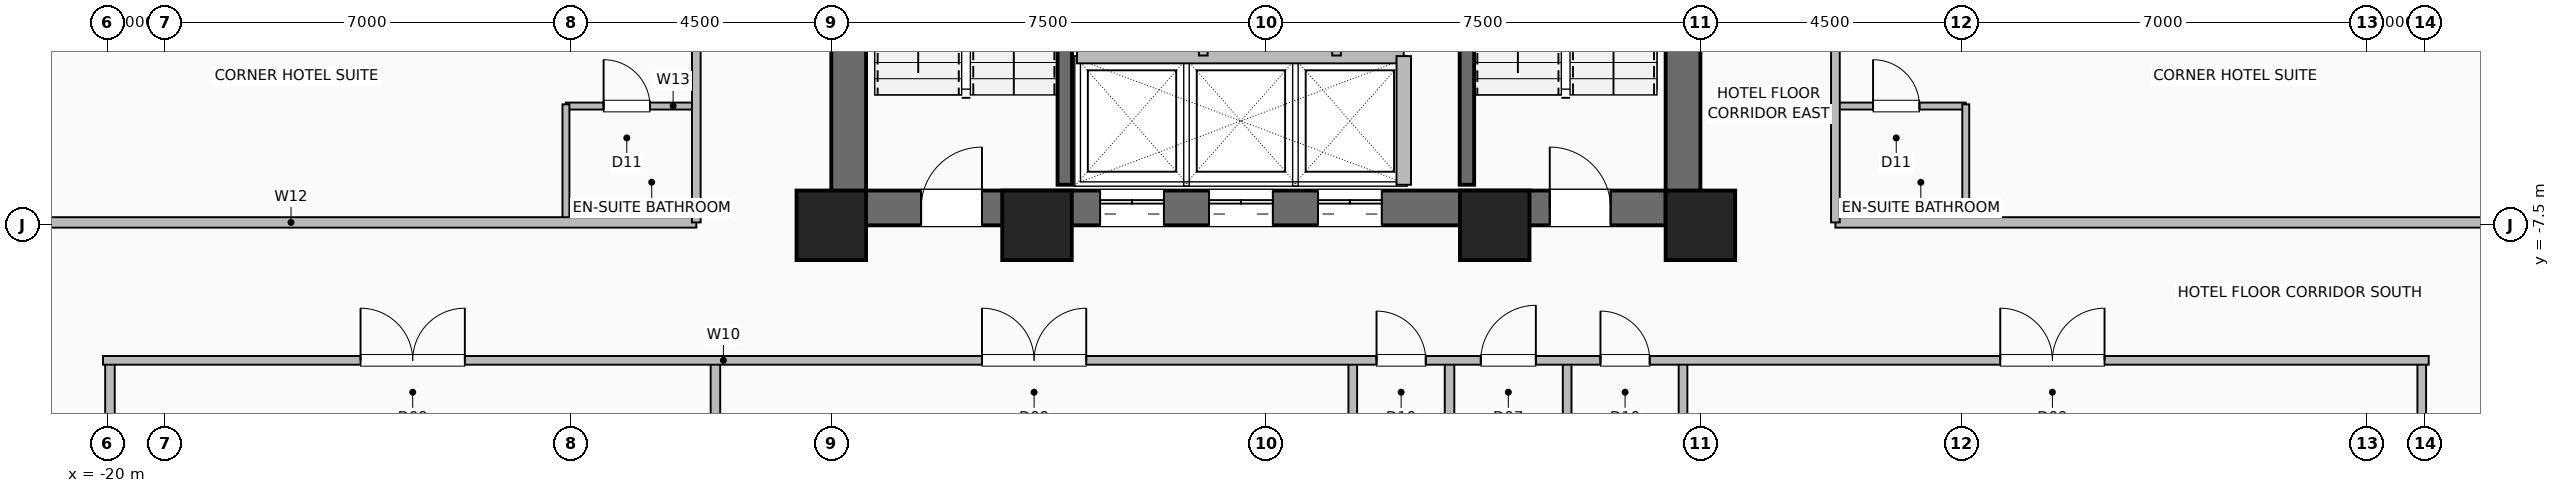
"""IFC4 building model, lengths in metres.
Left out: names, types, materials, properties, quantities, classifications, styles, units other than length and angle.
Written with IfcOpenShell. Run it as: python <this file> out.ifc"""

import sys

from ifc_helpers import new_model, si_unit, direction, frame, frame_2d, origin, origin_2d, place, context, subcontext, project, spatial, rectangle, hollow_rectangle, extrude, element, fill, save


model = new_model("IFC4")
c1 = context("Model", 3, precision=1e-05, world=origin(), true_north=direction((0.0, 1.0)))
c2 = subcontext(c1, "Body", "Model", "MODEL_VIEW")
j1 = project(units=[si_unit("LENGTHUNIT", "METRE"), si_unit("PLANEANGLEUNIT", "RADIAN")], contexts=[c1])
p1 = place(None, origin())
s1 = spatial("IfcSite", under=j1, at=p1, CompositionType="ELEMENT")
p2 = place(p1, origin())
s2 = spatial("IfcBuilding", under=s1, at=p2, CompositionType="ELEMENT")
p3 = place(p2, frame((0.0, 0.0, 48.0)))
s3 = spatial("IfcBuildingStorey", under=s2, at=p3, CompositionType="ELEMENT", Elevation=48.0)
for number, where, z_axis, x_axis in (
    (1, (-7.5, -7.5, 0.0), (0.0, 0.0, 1.0), (1.0, 0.0, 0.0)),
    (2, (-3.95, -7.5, 0.0), (0.0, 0.0, 1.0), (1.0, 0.0, 0.0)),
    (3, (3.95, -7.5, 0.0), (0.0, 0.0, 1.0), (1.0, 0.0, 0.0)),
    (4, (7.5, -7.5, 0.0), (0.0, 0.0, 1.0), (1.0, 0.0, 0.0)),
):
    element("IfcColumn", number, at=place(p3, frame(where, z_axis=z_axis, x_axis=x_axis)), inside=s3, PredefinedType="COLUMN", context=c2, shape_type="SweptSolid", body=[
        extrude(hollow_rectangle(XDim=1.2, YDim=1.2, WallThickness=0.055, at=origin_2d()), origin(), (0.0, 0.0, 1.0), 3.5),
    ])
p4 = place(p3, frame((-7.5, -7.2, 0.0), z_axis=(0.0, 0.0, 1.0), x_axis=(1.0, 0.0, 0.0)))
e5 = element("IfcWall", 5, at=p4, inside=s3, PredefinedType="SHEAR", context=c2, shape_type="SweptSolid", body=[
    extrude(rectangle(XDim=15.0, YDim=0.6, at=frame_2d((7.5, 0.0))), origin(), (0.0, 0.0, 1.0), 3.25),
])
p5 = place(p4, frame((1.55, 0.0, 0.0)))
e6 = element("IfcOpeningElement", 6, at=p5, cuts=e5, PredefinedType="OPENING", context=c2, shape_type="SweptSolid", body=[
    extrude(rectangle(XDim=1.05, YDim=2.08, at=frame_2d((0.525, 1.04))), frame((0.0, 0.31, 0.0), z_axis=(0.0, -1.0, 0.0), x_axis=(1.0, 0.0, 0.0)), (0.0, 0.0, 1.0), 0.62),
])
p6 = place(p4, frame((12.4, 0.0, 0.0)))
e7 = element("IfcOpeningElement", 7, at=p6, cuts=e5, PredefinedType="OPENING", context=c2, shape_type="SweptSolid", body=[
    extrude(rectangle(XDim=1.05, YDim=2.08, at=frame_2d((0.525, 1.04))), frame((0.0, 0.31, 0.0), z_axis=(0.0, -1.0, 0.0), x_axis=(1.0, 0.0, 0.0)), (0.0, 0.0, 1.0), 0.62),
])
p7 = place(p4, frame((4.64, 0.0, 0.0)))
e8 = element("IfcOpeningElement", 8, at=p7, cuts=e5, PredefinedType="OPENING", context=c2, shape_type="SweptSolid", body=[
    extrude(rectangle(XDim=1.1, YDim=2.2, at=frame_2d((0.55, 1.1))), frame((0.0, 0.31, 0.0), z_axis=(0.0, -1.0, 0.0), x_axis=(1.0, 0.0, 0.0)), (0.0, 0.0, 1.0), 0.62),
])
p8 = place(p4, frame((6.52, 0.0, 0.0)))
e9 = element("IfcOpeningElement", 9, at=p8, cuts=e5, PredefinedType="OPENING", context=c2, shape_type="SweptSolid", body=[
    extrude(rectangle(XDim=1.1, YDim=2.2, at=frame_2d((0.55, 1.1))), frame((0.0, 0.31, 0.0), z_axis=(0.0, -1.0, 0.0), x_axis=(1.0, 0.0, 0.0)), (0.0, 0.0, 1.0), 0.62),
])
p9 = place(p4, frame((8.4, 0.0, 0.0)))
e10 = element("IfcOpeningElement", 10, at=p9, cuts=e5, PredefinedType="OPENING", context=c2, shape_type="SweptSolid", body=[
    extrude(rectangle(XDim=1.1, YDim=2.2, at=frame_2d((0.55, 1.1))), frame((0.0, 0.31, 0.0), z_axis=(0.0, -1.0, 0.0), x_axis=(1.0, 0.0, 0.0)), (0.0, 0.0, 1.0), 0.62),
])
p10 = place(p3, frame((-7.2, -7.5, 0.0), z_axis=(0.0, 0.0, 1.0), x_axis=(0.0, 1.0, 0.0)))
e11 = element("IfcWall", 11, at=p10, inside=s3, PredefinedType="SHEAR", context=c2, shape_type="SweptSolid", body=[
    extrude(rectangle(XDim=15.0, YDim=0.6, at=frame_2d((7.5, 0.0))), origin(), (0.0, 0.0, 1.0), 3.25),
])
p11 = place(p10, frame((9.5, 0.0, 0.0)))
e12 = element("IfcOpeningElement", 12, at=p11, cuts=e11, PredefinedType="OPENING", context=c2, shape_type="SweptSolid", body=[
    extrude(rectangle(XDim=1.0, YDim=2.08, at=frame_2d((0.5, 1.04))), frame((0.0, 0.31, 0.0), z_axis=(0.0, -1.0, 0.0), x_axis=(1.0, 0.0, 0.0)), (0.0, 0.0, 1.0), 0.62),
])
p12 = place(p3, frame((7.2, -7.5, 0.0), z_axis=(0.0, 0.0, 1.0), x_axis=(0.0, 1.0, 0.0)))
e13 = element("IfcWall", 13, at=p12, inside=s3, PredefinedType="SHEAR", context=c2, shape_type="SweptSolid", body=[
    extrude(rectangle(XDim=15.0, YDim=0.6, at=frame_2d((7.5, 0.0))), origin(), (0.0, 0.0, 1.0), 3.25),
])
for number, where, z_axis, x_axis in (
    (14, (-3.47, -6.8, 0.0), (0.0, 0.0, 1.0), (0.0, 1.0, 0.0)),
    (15, (3.47, -6.8, 0.0), (0.0, 0.0, 1.0), (0.0, 1.0, 0.0)),
):
    element("IfcWall", number, at=place(p3, frame(where, z_axis=z_axis, x_axis=x_axis)), inside=s3, PredefinedType="SHEAR", context=c2, shape_type="SweptSolid", body=[
        extrude(rectangle(XDim=7.72, YDim=0.25, at=frame_2d((3.86, 0.0))), origin(), (0.0, 0.0, 1.0), 3.25),
    ])
p13 = place(p3, frame((-3.26, -4.58, 0.0), z_axis=(0.0, 0.0, 1.0), x_axis=(1.0, 0.0, 0.0)))
e16 = element("IfcWall", 16, at=p13, inside=s3, PredefinedType="SHEAR", context=c2, shape_type="SweptSolid", body=[
    extrude(rectangle(XDim=5.64, YDim=0.25, at=frame_2d((2.82, 0.0))), origin(), (0.0, 0.0, 1.0), 3.25),
])
p14 = place(p3, frame((2.38, -6.8, 0.0), z_axis=(0.0, 0.0, 1.0), x_axis=(0.0, 1.0, 0.0)))
e17 = element("IfcWall", 17, at=p14, inside=s3, PredefinedType="SHEAR", context=c2, shape_type="SweptSolid", body=[
    extrude(rectangle(XDim=2.22, YDim=0.25, at=frame_2d((1.11, 0.0))), origin(), (0.0, 0.0, 1.0), 3.25),
])
p15 = place(p3, frame((-1.08, -4.57, 0.0), z_axis=(0.0, 0.0, 1.0), x_axis=(0.0, 1.0, 0.0)))
e18 = element("IfcWall", 18, at=p15, inside=s3, PredefinedType="PARTITIONING", context=c2, shape_type="SweptSolid", body=[
    extrude(rectangle(XDim=2.14, YDim=0.15, at=frame_2d((1.07, 0.0))), origin(), (0.0, 0.0, 1.0), 3.25),
])
p16 = place(p15, frame((0.55, 0.0, 0.0)))
e19 = element("IfcOpeningElement", 19, at=p16, cuts=e18, PredefinedType="OPENING", context=c2, shape_type="SweptSolid", body=[
    extrude(rectangle(XDim=0.82, YDim=2.05, at=frame_2d((0.41, 1.025))), frame((0.0, 0.085, 0.0), z_axis=(0.0, -1.0, 0.0), x_axis=(1.0, 0.0, 0.0)), (0.0, 0.0, 1.0), 0.17),
])
p17 = place(p3, frame((1.22, -4.57, 0.0), z_axis=(0.0, 0.0, 1.0), x_axis=(0.0, 1.0, 0.0)))
e20 = element("IfcWall", 20, at=p17, inside=s3, PredefinedType="PARTITIONING", context=c2, shape_type="SweptSolid", body=[
    extrude(rectangle(XDim=2.14, YDim=0.15, at=frame_2d((1.07, 0.0))), origin(), (0.0, 0.0, 1.0), 3.25),
])
p18 = place(p17, frame((0.55, 0.0, 0.0)))
e21 = element("IfcOpeningElement", 21, at=p18, cuts=e20, PredefinedType="OPENING", context=c2, shape_type="SweptSolid", body=[
    extrude(rectangle(XDim=0.82, YDim=2.05, at=frame_2d((0.41, 1.025))), frame((0.0, 0.085, 0.0), z_axis=(0.0, -1.0, 0.0), x_axis=(1.0, 0.0, 0.0)), (0.0, 0.0, 1.0), 0.17),
])
for number, where, z_axis, x_axis in (
    (22, (3.17, -23.82, 0.0), (0.0, 0.0, 1.0), (0.0, 1.0, 0.0)),
    (23, (-19.95, -23.82, 0.0), (0.0, 0.0, 1.0), (0.0, 1.0, 0.0)),
    (24, (-9.5, -23.82, 0.0), (0.0, 0.0, 1.0), (0.0, 1.0, 0.0)),
):
    element("IfcWall", number, at=place(p3, frame(where, z_axis=z_axis, x_axis=x_axis)), inside=s3, PredefinedType="PLUMBINGWALL", context=c2, shape_type="SweptSolid", body=[
        extrude(rectangle(XDim=13.99, YDim=0.165, at=frame_2d((6.995, 0.0))), origin(), (0.0, 0.0, 1.0), 3.25),
    ])
for number, where, z_axis, x_axis in (
    (25, (1.5, -23.82, 0.0), (0.0, 0.0, 1.0), (0.0, 1.0, 0.0)),
    (26, (5.2, -23.82, 0.0), (0.0, 0.0, 1.0), (0.0, 1.0, 0.0)),
    (27, (7.2, -23.82, 0.0), (0.0, 0.0, 1.0), (0.0, 1.0, 0.0)),
    (28, (19.95, -23.82, 0.0), (0.0, 0.0, 1.0), (0.0, 1.0, 0.0)),
):
    element("IfcWall", number, at=place(p3, frame(where, z_axis=z_axis, x_axis=x_axis)), inside=s3, PredefinedType="PARTITIONING", context=c2, shape_type="SweptSolid", body=[
        extrude(rectangle(XDim=13.99, YDim=0.15, at=frame_2d((6.995, 0.0))), origin(), (0.0, 0.0, 1.0), 3.25),
    ])
p19 = place(p3, frame((-20.07, -9.83, 0.0), z_axis=(0.0, 0.0, 1.0), x_axis=(1.0, 0.0, 0.0)))
e29 = element("IfcWall", 29, at=p19, inside=s3, PredefinedType="PARTITIONING", context=c2, shape_type="SweptSolid", body=[
    extrude(rectangle(XDim=40.14, YDim=0.15, at=frame_2d((20.07, 0.0))), origin(), (0.0, 0.0, 1.0), 3.25),
])
p20 = place(p19, frame((4.445, 0.0, 0.0)))
e30 = element("IfcOpeningElement", 30, at=p20, cuts=e29, PredefinedType="OPENING", context=c2, shape_type="SweptSolid", body=[
    extrude(rectangle(XDim=1.8, YDim=2.08, at=frame_2d((0.9, 1.04))), frame((0.0, 0.085, 0.0), z_axis=(0.0, -1.0, 0.0), x_axis=(1.0, 0.0, 0.0)), (0.0, 0.0, 1.0), 0.17),
])
p21 = place(p19, frame((15.17, 0.0, 0.0)))
e31 = element("IfcOpeningElement", 31, at=p21, cuts=e29, PredefinedType="OPENING", context=c2, shape_type="SweptSolid", body=[
    extrude(rectangle(XDim=1.8, YDim=2.08, at=frame_2d((0.9, 1.04))), frame((0.0, 0.085, 0.0), z_axis=(0.0, -1.0, 0.0), x_axis=(1.0, 0.0, 0.0)), (0.0, 0.0, 1.0), 0.17),
])
p22 = place(p19, frame((21.98, 0.0, 0.0)))
e32 = element("IfcOpeningElement", 32, at=p22, cuts=e29, PredefinedType="OPENING", context=c2, shape_type="SweptSolid", body=[
    extrude(rectangle(XDim=0.85, YDim=2.05, at=frame_2d((0.425, 1.025))), frame((0.0, 0.085, 0.0), z_axis=(0.0, -1.0, 0.0), x_axis=(1.0, 0.0, 0.0)), (0.0, 0.0, 1.0), 0.17),
])
p23 = place(p19, frame((23.78, 0.0, 0.0)))
e33 = element("IfcOpeningElement", 33, at=p23, cuts=e29, PredefinedType="OPENING", context=c2, shape_type="SweptSolid", body=[
    extrude(rectangle(XDim=0.95, YDim=2.06, at=frame_2d((0.475, 1.03))), frame((0.0, 0.085, 0.0), z_axis=(0.0, -1.0, 0.0), x_axis=(1.0, 0.0, 0.0)), (0.0, 0.0, 1.0), 0.17),
])
p24 = place(p19, frame((25.845, 0.0, 0.0)))
e34 = element("IfcOpeningElement", 34, at=p24, cuts=e29, PredefinedType="OPENING", context=c2, shape_type="SweptSolid", body=[
    extrude(rectangle(XDim=0.85, YDim=2.05, at=frame_2d((0.425, 1.025))), frame((0.0, 0.085, 0.0), z_axis=(0.0, -1.0, 0.0), x_axis=(1.0, 0.0, 0.0)), (0.0, 0.0, 1.0), 0.17),
])
p25 = place(p19, frame((32.745, 0.0, 0.0)))
e35 = element("IfcOpeningElement", 35, at=p25, cuts=e29, PredefinedType="OPENING", context=c2, shape_type="SweptSolid", body=[
    extrude(rectangle(XDim=1.8, YDim=2.08, at=frame_2d((0.9, 1.04))), frame((0.0, 0.085, 0.0), z_axis=(0.0, -1.0, 0.0), x_axis=(1.0, 0.0, 0.0)), (0.0, 0.0, 1.0), 0.17),
])
p26 = place(p3, frame((-12.08, -5.442, 0.0), z_axis=(0.0, 0.0, 1.0), x_axis=(1.0, 0.0, 0.0)))
e36 = element("IfcWall", 36, at=p26, inside=s3, PredefinedType="PLUMBINGWALL", context=c2, shape_type="SweptSolid", body=[
    extrude(rectangle(XDim=2.25, YDim=0.12, at=frame_2d((1.125, 0.0))), origin(), (0.0, 0.0, 1.0), 3.25),
])
p27 = place(p26, frame((0.65, 0.0, 0.0)))
e37 = element("IfcOpeningElement", 37, at=p27, cuts=e36, PredefinedType="OPENING", context=c2, shape_type="SweptSolid", body=[
    extrude(rectangle(XDim=0.8, YDim=2.05, at=frame_2d((0.4, 1.025))), frame((0.0, 0.07, 0.0), z_axis=(0.0, -1.0, 0.0), x_axis=(1.0, 0.0, 0.0)), (0.0, 0.0, 1.0), 0.14),
])
p28 = place(p3, frame((-12.08, -7.42, 0.0), z_axis=(0.0, 0.0, 1.0), x_axis=(0.0, 1.0, 0.0)))
e38 = element("IfcWall", 38, at=p28, inside=s3, PredefinedType="PLUMBINGWALL", context=c2, shape_type="SweptSolid", body=[
    extrude(rectangle(XDim=2.008, YDim=0.12, at=frame_2d((1.004, 0.0))), origin(), (0.0, 0.0, 1.0), 3.25),
])
p29 = place(p3, frame((-23.82, -7.45, 0.0), z_axis=(0.0, 0.0, 1.0), x_axis=(1.0, 0.0, 0.0)))
e39 = element("IfcWall", 39, at=p29, inside=s3, PredefinedType="PARTITIONING", context=c2, shape_type="SweptSolid", body=[
    extrude(rectangle(XDim=13.99, YDim=0.18, at=frame_2d((6.995, 0.0))), origin(), (0.0, 0.0, 1.0), 3.25),
])
p30 = place(p3, frame((-9.83, -7.45, 0.0), z_axis=(0.0, 0.0, 1.0), x_axis=(0.0, 1.0, 0.0)))
e40 = element("IfcWall", 40, at=p30, inside=s3, PredefinedType="PARTITIONING", context=c2, shape_type="SweptSolid", body=[
    extrude(rectangle(XDim=14.9, YDim=0.15, at=frame_2d((7.45, 0.0))), origin(), (0.0, 0.0, 1.0), 3.25),
])
p31 = place(p30, frame((3.049, 0.0, 0.0)))
e41 = element("IfcOpeningElement", 41, at=p31, cuts=e40, PredefinedType="OPENING", context=c2, shape_type="SweptSolid", body=[
    extrude(rectangle(XDim=0.95, YDim=2.08, at=frame_2d((0.475, 1.04))), frame((0.0, 0.085, 0.0), z_axis=(0.0, -1.0, 0.0), x_axis=(1.0, 0.0, 0.0)), (0.0, 0.0, 1.0), 0.17),
])
p32 = place(p30, frame((7.927, 0.0, 0.0)))
e42 = element("IfcOpeningElement", 42, at=p32, cuts=e40, PredefinedType="OPENING", context=c2, shape_type="SweptSolid", body=[
    extrude(rectangle(XDim=0.95, YDim=2.08, at=frame_2d((0.475, 1.04))), frame((0.0, 0.085, 0.0), z_axis=(0.0, -1.0, 0.0), x_axis=(1.0, 0.0, 0.0)), (0.0, 0.0, 1.0), 0.17),
])
p33 = place(p30, frame((12.899, 0.0, 0.0)))
e43 = element("IfcOpeningElement", 43, at=p33, cuts=e40, PredefinedType="OPENING", context=c2, shape_type="SweptSolid", body=[
    extrude(rectangle(XDim=0.95, YDim=2.08, at=frame_2d((0.475, 1.04))), frame((0.0, 0.085, 0.0), z_axis=(0.0, -1.0, 0.0), x_axis=(1.0, 0.0, 0.0)), (0.0, 0.0, 1.0), 0.17),
])
p34 = place(p3, frame((9.83, -5.442, 0.0), z_axis=(0.0, 0.0, 1.0), x_axis=(1.0, 0.0, 0.0)))
e44 = element("IfcWall", 44, at=p34, inside=s3, PredefinedType="PLUMBINGWALL", context=c2, shape_type="SweptSolid", body=[
    extrude(rectangle(XDim=2.25, YDim=0.12, at=frame_2d((1.125, 0.0))), origin(), (0.0, 0.0, 1.0), 3.25),
])
p35 = place(p34, frame((0.65, 0.0, 0.0)))
e45 = element("IfcOpeningElement", 45, at=p35, cuts=e44, PredefinedType="OPENING", context=c2, shape_type="SweptSolid", body=[
    extrude(rectangle(XDim=0.8, YDim=2.05, at=frame_2d((0.4, 1.025))), frame((0.0, 0.07, 0.0), z_axis=(0.0, -1.0, 0.0), x_axis=(1.0, 0.0, 0.0)), (0.0, 0.0, 1.0), 0.14),
])
p36 = place(p3, frame((12.08, -7.42, 0.0), z_axis=(0.0, 0.0, 1.0), x_axis=(0.0, 1.0, 0.0)))
e46 = element("IfcWall", 46, at=p36, inside=s3, PredefinedType="PLUMBINGWALL", context=c2, shape_type="SweptSolid", body=[
    extrude(rectangle(XDim=2.008, YDim=0.12, at=frame_2d((1.004, 0.0))), origin(), (0.0, 0.0, 1.0), 3.25),
])
p37 = place(p3, frame((9.83, -7.45, 0.0), z_axis=(0.0, 0.0, 1.0), x_axis=(1.0, 0.0, 0.0)))
e47 = element("IfcWall", 47, at=p37, inside=s3, PredefinedType="PARTITIONING", context=c2, shape_type="SweptSolid", body=[
    extrude(rectangle(XDim=13.99, YDim=0.18, at=frame_2d((6.995, 0.0))), origin(), (0.0, 0.0, 1.0), 3.25),
])
p38 = place(p3, frame((9.83, -7.45, 0.0), z_axis=(0.0, 0.0, 1.0), x_axis=(0.0, 1.0, 0.0)))
e48 = element("IfcWall", 48, at=p38, inside=s3, PredefinedType="PARTITIONING", context=c2, shape_type="SweptSolid", body=[
    extrude(rectangle(XDim=14.9, YDim=0.15, at=frame_2d((7.45, 0.0))), origin(), (0.0, 0.0, 1.0), 3.25),
])
p39 = place(p38, frame((3.049, 0.0, 0.0)))
e49 = element("IfcOpeningElement", 49, at=p39, cuts=e48, PredefinedType="OPENING", context=c2, shape_type="SweptSolid", body=[
    extrude(rectangle(XDim=0.95, YDim=2.08, at=frame_2d((0.475, 1.04))), frame((0.0, 0.085, 0.0), z_axis=(0.0, -1.0, 0.0), x_axis=(1.0, 0.0, 0.0)), (0.0, 0.0, 1.0), 0.17),
])
p40 = place(p38, frame((7.927, 0.0, 0.0)))
e50 = element("IfcOpeningElement", 50, at=p40, cuts=e48, PredefinedType="OPENING", context=c2, shape_type="SweptSolid", body=[
    extrude(rectangle(XDim=0.95, YDim=2.08, at=frame_2d((0.475, 1.04))), frame((0.0, 0.085, 0.0), z_axis=(0.0, -1.0, 0.0), x_axis=(1.0, 0.0, 0.0)), (0.0, 0.0, 1.0), 0.17),
])
p41 = place(p38, frame((12.899, 0.0, 0.0)))
e51 = element("IfcOpeningElement", 51, at=p41, cuts=e48, PredefinedType="OPENING", context=c2, shape_type="SweptSolid", body=[
    extrude(rectangle(XDim=0.95, YDim=2.08, at=frame_2d((0.475, 1.04))), frame((0.0, 0.085, 0.0), z_axis=(0.0, -1.0, 0.0), x_axis=(1.0, 0.0, 0.0)), (0.0, 0.0, 1.0), 0.17),
])
p42 = place(p5, origin())
e52 = element("IfcDoor", 52, at=p42, inside=s3, OperationType="SINGLE_SWING_RIGHT", PredefinedType="DOOR", context=c2, shape_type="SweptSolid", body=[
    extrude(rectangle(XDim=1.05, YDim=2.08, at=frame_2d((0.525, 1.04))), frame((0.0, 0.025, 0.0), z_axis=(0.0, -1.0, 0.0), x_axis=(1.0, 0.0, 0.0)), (0.0, 0.0, 1.0), 0.05),
])
fill(e6, e52)
p43 = place(p6, origin())
e53 = element("IfcDoor", 53, at=p43, inside=s3, OperationType="SINGLE_SWING_LEFT", PredefinedType="DOOR", context=c2, shape_type="SweptSolid", body=[
    extrude(rectangle(XDim=1.05, YDim=2.08, at=frame_2d((0.525, 1.04))), frame((0.0, 0.025, 0.0), z_axis=(0.0, -1.0, 0.0), x_axis=(1.0, 0.0, 0.0)), (0.0, 0.0, 1.0), 0.05),
])
fill(e7, e53)
p44 = place(p7, origin())
e54 = element("IfcDoor", 54, at=p44, inside=s3, OperationType="DOUBLE_DOOR_SLIDING", PredefinedType="DOOR", context=c2, shape_type="SweptSolid", body=[
    extrude(rectangle(XDim=1.1, YDim=2.2, at=frame_2d((0.55, 1.1))), frame((0.0, 0.025, 0.0), z_axis=(0.0, -1.0, 0.0), x_axis=(1.0, 0.0, 0.0)), (0.0, 0.0, 1.0), 0.05),
])
fill(e8, e54)
p45 = place(p8, origin())
e55 = element("IfcDoor", 55, at=p45, inside=s3, OperationType="DOUBLE_DOOR_SLIDING", PredefinedType="DOOR", context=c2, shape_type="SweptSolid", body=[
    extrude(rectangle(XDim=1.1, YDim=2.2, at=frame_2d((0.55, 1.1))), frame((0.0, 0.025, 0.0), z_axis=(0.0, -1.0, 0.0), x_axis=(1.0, 0.0, 0.0)), (0.0, 0.0, 1.0), 0.05),
])
fill(e9, e55)
p46 = place(p9, origin())
e56 = element("IfcDoor", 56, at=p46, inside=s3, OperationType="DOUBLE_DOOR_SLIDING", PredefinedType="DOOR", context=c2, shape_type="SweptSolid", body=[
    extrude(rectangle(XDim=1.1, YDim=2.2, at=frame_2d((0.55, 1.1))), frame((0.0, 0.025, 0.0), z_axis=(0.0, -1.0, 0.0), x_axis=(1.0, 0.0, 0.0)), (0.0, 0.0, 1.0), 0.05),
])
fill(e10, e56)
p47 = place(p20, origin())
e57 = element("IfcDoor", 57, at=p47, inside=s3, OperationType="DOUBLE_DOOR_SINGLE_SWING", PredefinedType="DOOR", context=c2, shape_type="SweptSolid", body=[
    extrude(rectangle(XDim=1.8, YDim=2.08, at=frame_2d((0.9, 1.04))), frame((0.0, 0.025, 0.0), z_axis=(0.0, -1.0, 0.0), x_axis=(1.0, 0.0, 0.0)), (0.0, 0.0, 1.0), 0.05),
])
fill(e30, e57)
p48 = place(p21, origin())
e58 = element("IfcDoor", 58, at=p48, inside=s3, OperationType="DOUBLE_DOOR_SINGLE_SWING", PredefinedType="DOOR", context=c2, shape_type="SweptSolid", body=[
    extrude(rectangle(XDim=1.8, YDim=2.08, at=frame_2d((0.9, 1.04))), frame((0.0, 0.025, 0.0), z_axis=(0.0, -1.0, 0.0), x_axis=(1.0, 0.0, 0.0)), (0.0, 0.0, 1.0), 0.05),
])
fill(e31, e58)
p49 = place(p22, origin())
e59 = element("IfcDoor", 59, at=p49, inside=s3, OperationType="SINGLE_SWING_LEFT", PredefinedType="DOOR", context=c2, shape_type="SweptSolid", body=[
    extrude(rectangle(XDim=0.85, YDim=2.05, at=frame_2d((0.425, 1.025))), frame((0.0, 0.025, 0.0), z_axis=(0.0, -1.0, 0.0), x_axis=(1.0, 0.0, 0.0)), (0.0, 0.0, 1.0), 0.05),
])
fill(e32, e59)
p50 = place(p23, origin())
e60 = element("IfcDoor", 60, at=p50, inside=s3, OperationType="SINGLE_SWING_RIGHT", PredefinedType="DOOR", context=c2, shape_type="SweptSolid", body=[
    extrude(rectangle(XDim=0.95, YDim=2.06, at=frame_2d((0.475, 1.03))), frame((0.0, 0.025, 0.0), z_axis=(0.0, -1.0, 0.0), x_axis=(1.0, 0.0, 0.0)), (0.0, 0.0, 1.0), 0.05),
])
fill(e33, e60)
p51 = place(p24, origin())
e61 = element("IfcDoor", 61, at=p51, inside=s3, OperationType="SINGLE_SWING_LEFT", PredefinedType="DOOR", context=c2, shape_type="SweptSolid", body=[
    extrude(rectangle(XDim=0.85, YDim=2.05, at=frame_2d((0.425, 1.025))), frame((0.0, 0.025, 0.0), z_axis=(0.0, -1.0, 0.0), x_axis=(1.0, 0.0, 0.0)), (0.0, 0.0, 1.0), 0.05),
])
fill(e34, e61)
p52 = place(p25, origin())
e62 = element("IfcDoor", 62, at=p52, inside=s3, OperationType="DOUBLE_DOOR_SINGLE_SWING", PredefinedType="DOOR", context=c2, shape_type="SweptSolid", body=[
    extrude(rectangle(XDim=1.8, YDim=2.08, at=frame_2d((0.9, 1.04))), frame((0.0, 0.025, 0.0), z_axis=(0.0, -1.0, 0.0), x_axis=(1.0, 0.0, 0.0)), (0.0, 0.0, 1.0), 0.05),
])
fill(e35, e62)
p53 = place(p27, origin())
e63 = element("IfcDoor", 63, at=p53, inside=s3, OperationType="SINGLE_SWING_LEFT", PredefinedType="DOOR", context=c2, shape_type="SweptSolid", body=[
    extrude(rectangle(XDim=0.8, YDim=2.05, at=frame_2d((0.4, 1.025))), frame((0.0, 0.025, 0.0), z_axis=(0.0, -1.0, 0.0), x_axis=(1.0, 0.0, 0.0)), (0.0, 0.0, 1.0), 0.05),
])
fill(e37, e63)
p54 = place(p35, origin())
e64 = element("IfcDoor", 64, at=p54, inside=s3, OperationType="SINGLE_SWING_LEFT", PredefinedType="DOOR", context=c2, shape_type="SweptSolid", body=[
    extrude(rectangle(XDim=0.8, YDim=2.05, at=frame_2d((0.4, 1.025))), frame((0.0, 0.025, 0.0), z_axis=(0.0, -1.0, 0.0), x_axis=(1.0, 0.0, 0.0)), (0.0, 0.0, 1.0), 0.05),
])
fill(e45, e64)
save(model, sys.argv[1])
